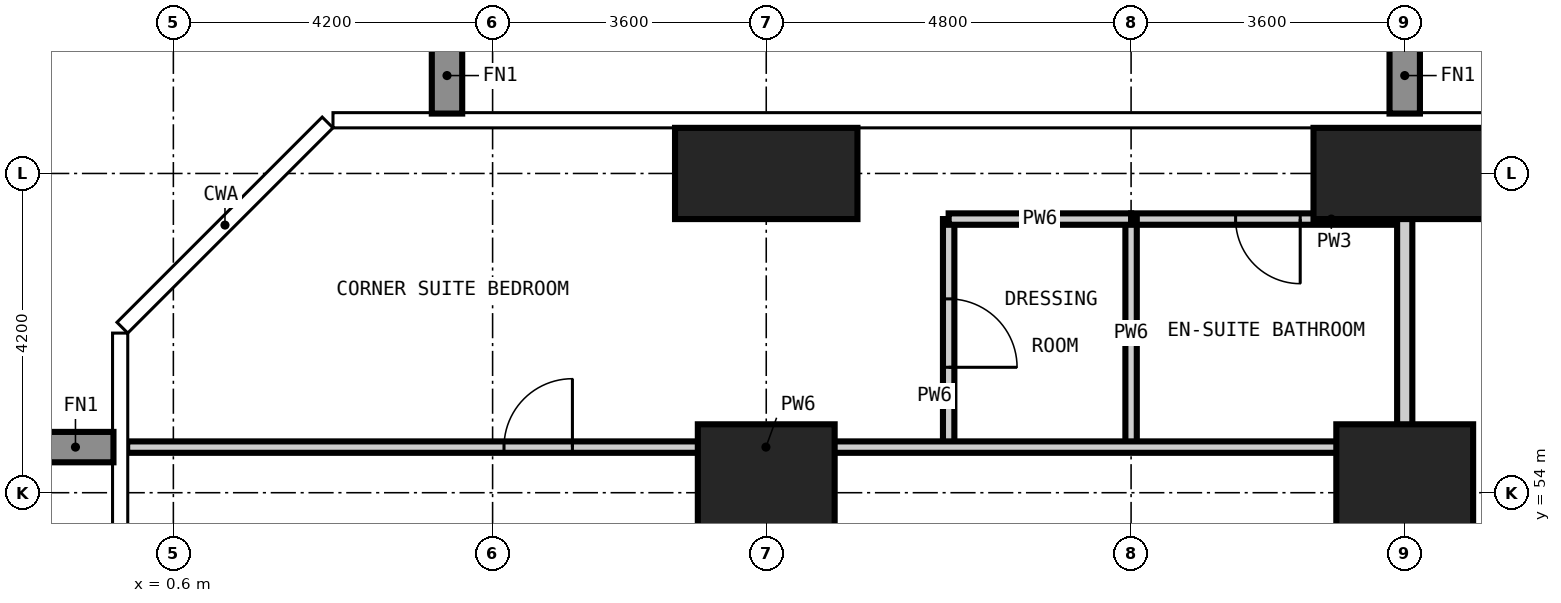
"""IFC4 building model, lengths in metres.
Left out: names, types, materials, properties, quantities, classifications, styles, units other than length and angle.
Written with IfcOpenShell. Run it as: python <this file> out.ifc"""

import sys

from ifc_helpers import new_model, si_unit, direction, frame, frame_2d, origin, origin_2d, place, context, subcontext, project, spatial, rectangle, extrude, element, fill, save


model = new_model("IFC4")
c1 = context("Model", 3, precision=1e-05, world=origin(), true_north=direction((0.0, 1.0)))
c2 = subcontext(c1, "Body", "Model", "MODEL_VIEW")
j1 = project(units=[si_unit("LENGTHUNIT", "METRE"), si_unit("PLANEANGLEUNIT", "RADIAN")], contexts=[c1])
p1 = place(None, origin())
s1 = spatial("IfcSite", under=j1, at=p1, CompositionType="ELEMENT")
p2 = place(p1, origin())
s2 = spatial("IfcBuilding", under=s1, at=p2, CompositionType="ELEMENT")
p3 = place(p2, frame((0.0, 0.0, 45.0)))
s3 = spatial("IfcBuildingStorey", under=s2, at=p3, CompositionType="ELEMENT", Elevation=45.0)
p4 = place(p3, frame((8.4, 54.0, -0.35), z_axis=(0.0, 0.0, 1.0), x_axis=(1.0, 0.0, 0.0)))
e1 = element("IfcColumn", 1, at=p4, inside=s3, PredefinedType="COLUMN", context=c2, shape_type="SweptSolid", body=[
    extrude(rectangle(XDim=1.8, YDim=1.8, at=origin_2d()), origin(), (0.0, 0.0, 1.0), 3.6),
])
p5 = place(p3, frame((8.4, 58.2, -0.35), z_axis=(0.0, 0.0, 1.0), x_axis=(1.0, 0.0, 0.0)))
e2 = element("IfcColumn", 2, at=p5, inside=s3, PredefinedType="COLUMN", context=c2, shape_type="SweptSolid", body=[
    extrude(rectangle(XDim=2.4, YDim=1.2, at=origin_2d()), origin(), (0.0, 0.0, 1.0), 3.6),
])
p6 = place(p3, frame((16.8, 54.0, -0.35), z_axis=(0.0, 0.0, 1.0), x_axis=(1.0, 0.0, 0.0)))
e3 = element("IfcColumn", 3, at=p6, inside=s3, PredefinedType="COLUMN", context=c2, shape_type="SweptSolid", body=[
    extrude(rectangle(XDim=1.8, YDim=1.8, at=origin_2d()), origin(), (0.0, 0.0, 1.0), 3.6),
])
p7 = place(p3, frame((16.8, 58.2, -0.35), z_axis=(0.0, 0.0, 1.0), x_axis=(1.0, 0.0, 0.0)))
e4 = element("IfcColumn", 4, at=p7, inside=s3, PredefinedType="COLUMN", context=c2, shape_type="SweptSolid", body=[
    extrude(rectangle(XDim=2.4, YDim=1.2, at=origin_2d()), origin(), (0.0, 0.0, 1.0), 3.6),
])
p8 = place(p3, frame((13.2, 57.6, 0.0), z_axis=(0.0, 0.0, 1.0), x_axis=(1.0, 0.0, 0.0)))
e5 = element("IfcWall", 5, at=p8, inside=s3, PredefinedType="PARTITIONING", context=c2, shape_type="SweptSolid", body=[
    extrude(rectangle(XDim=3.6, YDim=0.15, at=frame_2d((1.8, 0.0))), origin(), (0.0, 0.0, 1.0), 3.25),
])
p9 = place(p8, frame((1.375, 0.0, 0.0)))
e6 = element("IfcOpeningElement", 6, at=p9, cuts=e5, PredefinedType="OPENING", context=c2, shape_type="SweptSolid", body=[
    extrude(rectangle(XDim=0.85, YDim=2.1, at=frame_2d((0.425, 1.05))), frame((0.0, 0.085, 0.0), z_axis=(0.0, -1.0, 0.0), x_axis=(1.0, 0.0, 0.0)), (0.0, 0.0, 1.0), 0.17),
])
p10 = place(p3, frame((16.8, 45.55, 0.0), z_axis=(0.0, 0.0, 1.0), x_axis=(0.0, 1.0, 0.0)))
e7 = element("IfcWall", 7, at=p10, inside=s3, PredefinedType="PARTITIONING", context=c2, shape_type="SweptSolid", body=[
    extrude(rectangle(XDim=13.258, YDim=0.2, at=frame_2d((6.629, 0.0))), origin(), (0.0, 0.0, 1.0), 3.25),
])
p11 = place(p3, frame((10.8, 54.6, 0.0), z_axis=(0.0, 0.0, 1.0), x_axis=(0.0, 1.0, 0.0)))
e8 = element("IfcWall", 8, at=p11, inside=s3, PredefinedType="PARTITIONING", context=c2, shape_type="SweptSolid", body=[
    extrude(rectangle(XDim=3.0, YDim=0.15, at=frame_2d((1.5, 0.0))), origin(), (0.0, 0.0, 1.0), 3.25),
])
p12 = place(p11, frame((1.05, 0.0, 0.0)))
e9 = element("IfcOpeningElement", 9, at=p12, cuts=e8, PredefinedType="OPENING", context=c2, shape_type="SweptSolid", body=[
    extrude(rectangle(XDim=0.9, YDim=2.1, at=frame_2d((0.45, 1.05))), frame((0.0, 0.085, 0.0), z_axis=(0.0, -1.0, 0.0), x_axis=(1.0, 0.0, 0.0)), (0.0, 0.0, 1.0), 0.17),
])
p13 = place(p3, frame((13.2, 54.6, 0.0), z_axis=(0.0, 0.0, 1.0), x_axis=(0.0, 1.0, 0.0)))
e10 = element("IfcWall", 10, at=p13, inside=s3, PredefinedType="PARTITIONING", context=c2, shape_type="SweptSolid", body=[
    extrude(rectangle(XDim=3.0, YDim=0.15, at=frame_2d((1.5, 0.0))), origin(), (0.0, 0.0, 1.0), 3.25),
])
p14 = place(p3, frame((-0.008, 54.6, 0.0), z_axis=(0.0, 0.0, 1.0), x_axis=(1.0, 0.0, 0.0)))
e11 = element("IfcWall", 11, at=p14, inside=s3, PredefinedType="PARTITIONING", context=c2, shape_type="SweptSolid", body=[
    extrude(rectangle(XDim=16.808, YDim=0.15, at=frame_2d((8.404, 0.0))), origin(), (0.0, 0.0, 1.0), 3.25),
])
p15 = place(p14, frame((4.958, 0.0, 0.0)))
e12 = element("IfcOpeningElement", 12, at=p15, cuts=e11, PredefinedType="OPENING", context=c2, shape_type="SweptSolid", body=[
    extrude(rectangle(XDim=0.9, YDim=2.1, at=frame_2d((0.45, 1.05))), frame((0.0, 0.085, 0.0), z_axis=(0.0, -1.0, 0.0), x_axis=(1.0, 0.0, 0.0)), (0.0, 0.0, 1.0), 0.17),
])
p16 = place(p3, frame((10.8, 57.6, 0.0), z_axis=(0.0, 0.0, 1.0), x_axis=(1.0, 0.0, 0.0)))
e13 = element("IfcWall", 13, at=p16, inside=s3, PredefinedType="PARTITIONING", context=c2, shape_type="SweptSolid", body=[
    extrude(rectangle(XDim=2.4, YDim=0.15, at=frame_2d((1.2, 0.0))), origin(), (0.0, 0.0, 1.0), 3.25),
])
p17 = place(p15, origin())
e14 = element("IfcDoor", 14, at=p17, inside=s3, OperationType="SINGLE_SWING_RIGHT", PredefinedType="DOOR", context=c2, shape_type="SweptSolid", body=[
    extrude(rectangle(XDim=0.9, YDim=2.1, at=frame_2d((0.45, 1.05))), frame((0.0, 0.025, 0.0), z_axis=(0.0, -1.0, 0.0), x_axis=(1.0, 0.0, 0.0)), (0.0, 0.0, 1.0), 0.05),
])
fill(e12, e14)
p18 = place(p9, frame((0.85, 0.0, 0.0), z_axis=(0.0, 0.0, 1.0), x_axis=(-1.0, 0.0, 0.0)))
e15 = element("IfcDoor", 15, at=p18, inside=s3, OperationType="SINGLE_SWING_LEFT", PredefinedType="DOOR", context=c2, shape_type="SweptSolid", body=[
    extrude(rectangle(XDim=0.85, YDim=2.1, at=frame_2d((0.425, 1.05))), frame((0.0, 0.025, 0.0), z_axis=(0.0, -1.0, 0.0), x_axis=(1.0, 0.0, 0.0)), (0.0, 0.0, 1.0), 0.05),
])
fill(e6, e15)
p19 = place(p12, frame((0.9, 0.0, 0.0), z_axis=(0.0, 0.0, 1.0), x_axis=(-1.0, 0.0, 0.0)))
e16 = element("IfcDoor", 16, at=p19, inside=s3, OperationType="SINGLE_SWING_RIGHT", PredefinedType="DOOR", context=c2, shape_type="SweptSolid", body=[
    extrude(rectangle(XDim=0.9, YDim=2.1, at=frame_2d((0.45, 1.05))), frame((0.0, 0.025, 0.0), z_axis=(0.0, -1.0, 0.0), x_axis=(1.0, 0.0, 0.0)), (0.0, 0.0, 1.0), 0.05),
])
fill(e9, e16)
save(model, sys.argv[1])
